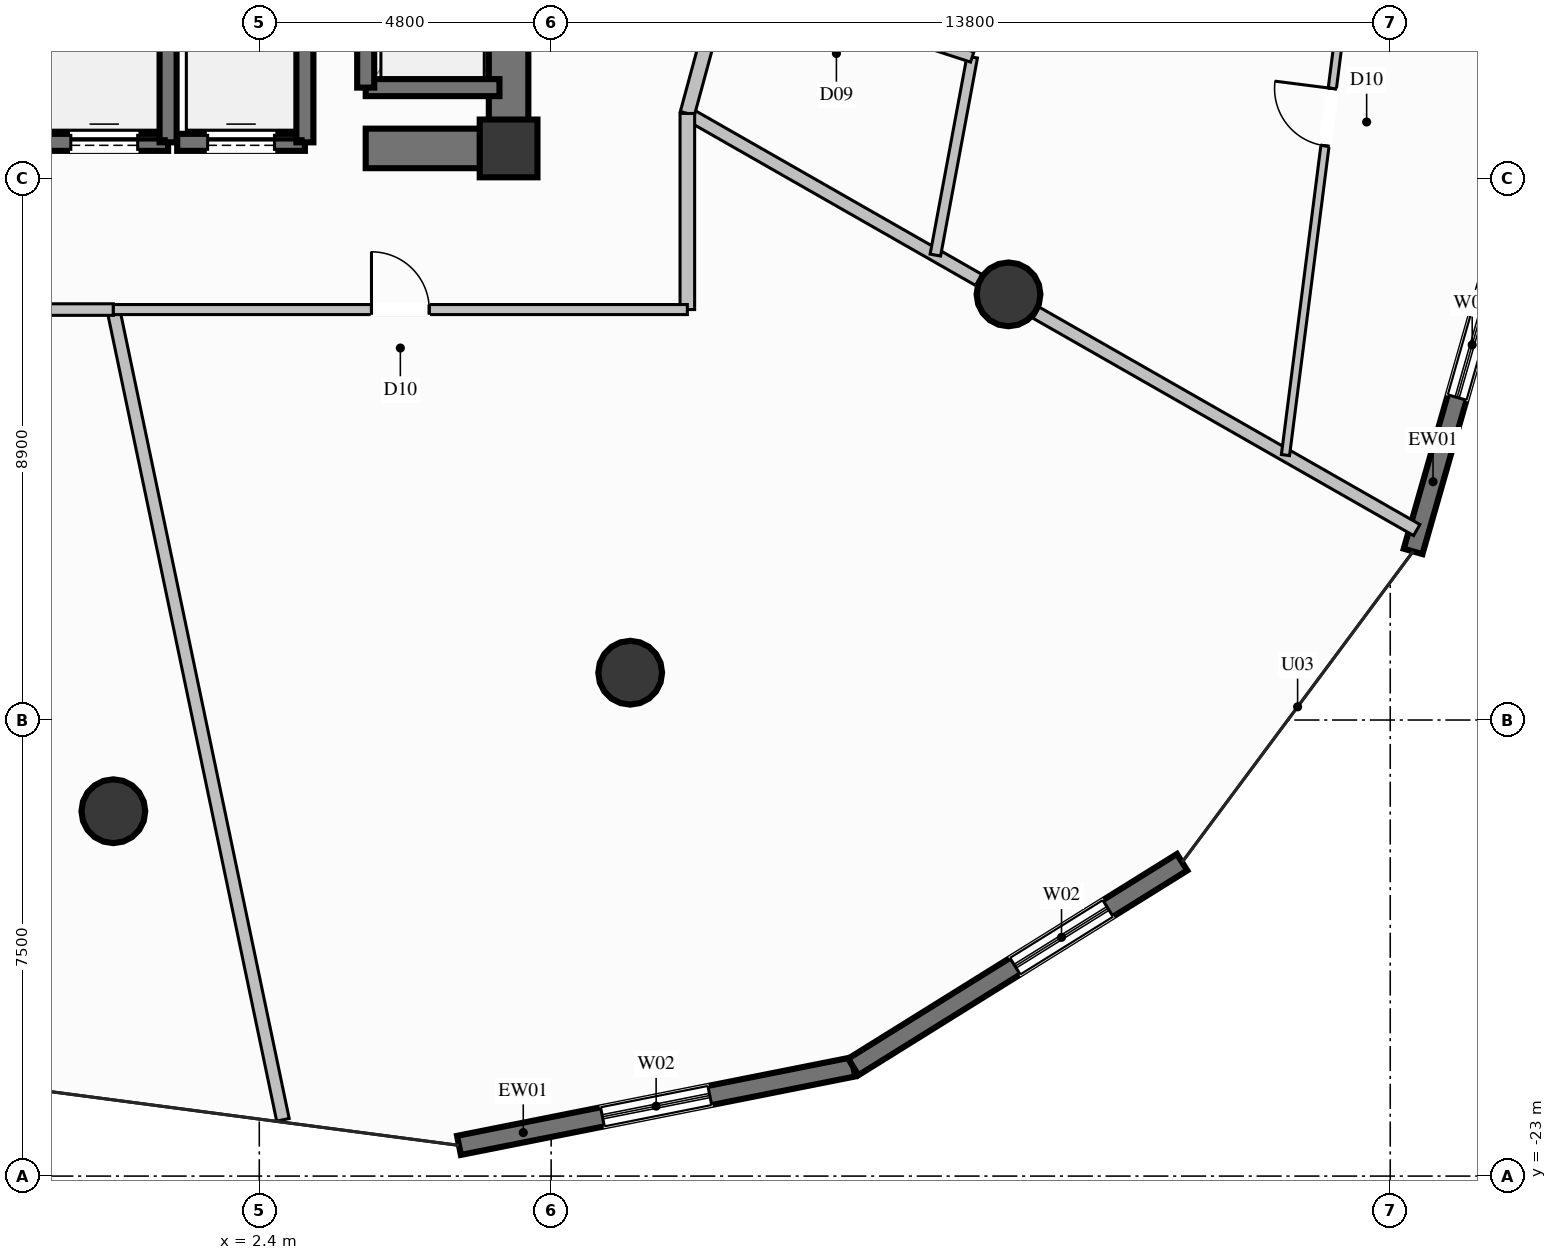
"""IFC4 building model, lengths in metres.
Left out: names, types, materials, properties, quantities, classifications, styles, units other than length and angle.
Written with IfcOpenShell. Run it as: python <this file> out.ifc"""

import sys

from ifc_helpers import new_model, si_unit, direction, frame, frame_2d, origin, origin_2d, place, context, subcontext, project, spatial, rectangle, circle, extrude, element, fill, save


model = new_model("IFC4")
c1 = context("Model", 3, precision=1e-05, world=origin(), true_north=direction((0.0, 1.0)))
c2 = subcontext(c1, "Body", "Model", "MODEL_VIEW")
j1 = project(units=[si_unit("LENGTHUNIT", "METRE"), si_unit("PLANEANGLEUNIT", "RADIAN")], contexts=[c1])
p1 = place(None, origin())
s1 = spatial("IfcSite", under=j1, at=p1, CompositionType="ELEMENT")
p2 = place(p1, origin())
s2 = spatial("IfcBuilding", under=s1, at=p2, CompositionType="ELEMENT")
p3 = place(p2, frame((0.0, 0.0, 153.0)))
s3 = spatial("IfcBuildingStorey", under=s2, at=p3, CompositionType="ELEMENT", Elevation=153.0)
p4 = place(p3, frame((6.5, -6.1, 0.0), z_axis=(0.0, 0.0, 1.0), x_axis=(1.0, 0.0, 0.0)))
e1 = element("IfcColumn", 1, at=p4, inside=s3, PredefinedType="COLUMN", context=c2, shape_type="SweptSolid", body=[
    extrude(rectangle(XDim=0.95, YDim=0.95, at=origin_2d()), origin(), (0.0, 0.0, 1.0), 3.6),
])
p5 = place(p3, frame((4.15, -6.1, 0.0), z_axis=(0.0, 0.0, 1.0), x_axis=(1.0, 0.0, 0.0)))
e2 = element("IfcWall", 2, at=p5, inside=s3, PredefinedType="SHEAR", context=c2, shape_type="SweptSolid", body=[
    extrude(rectangle(XDim=2.025, YDim=0.65, at=frame_2d((1.013, 0.0))), origin(), (0.0, 0.0, 1.0), 3.6),
])
p6 = place(p3, frame((6.5, -6.425, 0.0), z_axis=(0.0, 0.0, 1.0), x_axis=(0.0, 1.0, 0.0)))
e3 = element("IfcWall", 3, at=p6, inside=s3, PredefinedType="SHEAR", context=c2, shape_type="SweptSolid", body=[
    extrude(rectangle(XDim=4.075, YDim=0.65, at=frame_2d((2.038, 0.0))), origin(), (0.0, 0.0, 1.0), 3.6),
])
for number, where, z_axis, x_axis in (
    (4, (0.0, -17.0, 0.0), (0.0, 0.0, 1.0), (1.0, 0.0, 0.0)),
    (5, (8.5, -14.722, 0.0), (0.0, 0.0, 1.0), (1.0, 0.0, 0.0)),
    (6, (14.722, -8.5, 0.0), (0.0, 0.0, 1.0), (1.0, 0.0, 0.0)),
):
    element("IfcColumn", number, at=place(p3, frame(where, z_axis=z_axis, x_axis=x_axis)), inside=s3, PredefinedType="COLUMN", context=c2, shape_type="SweptSolid", body=[
        extrude(circle(Radius=0.525, at=origin_2d()), origin(), (0.0, 0.0, 1.0), 3.6),
    ])
p7 = place(p3, frame((23.195, -6.369, 0.0), z_axis=(0.0, 0.0, 1.0), x_axis=(-0.275067292431, -0.961424976082, 0.0)))
e7 = element("IfcWall", 7, at=p7, inside=s3, PredefinedType="SOLIDWALL", context=c2, shape_type="SweptSolid", body=[
    extrude(rectangle(XDim=6.613, YDim=0.32, at=frame_2d((3.307, 0.0))), origin(), (0.0, 0.0, 1.0), 3.35),
])
p8 = place(p7, frame((2.18, 0.0, 0.35)))
e8 = element("IfcOpeningElement", 8, at=p8, cuts=e7, PredefinedType="OPENING", context=c2, shape_type="SweptSolid", body=[
    extrude(rectangle(XDim=1.8, YDim=2.6, at=frame_2d((0.9, 1.3))), frame((0.0, 0.17, 0.0), z_axis=(0.0, -1.0, 0.0), x_axis=(1.0, 0.0, 0.0)), (0.0, 0.0, 1.0), 0.34),
])
p9 = place(p3, frame((12.169, -21.205, 0.0), z_axis=(0.0, 0.0, 1.0), x_axis=(-0.980781820462, -0.195107715508, 0.0)))
e9 = element("IfcWall", 9, at=p9, inside=s3, PredefinedType="SOLIDWALL", context=c2, shape_type="SweptSolid", body=[
    extrude(rectangle(XDim=6.612, YDim=0.32, at=frame_2d((3.306, 0.0))), origin(), (0.0, 0.0, 1.0), 3.35),
])
p10 = place(p9, frame((2.406, 0.0, 0.35)))
e10 = element("IfcOpeningElement", 10, at=p10, cuts=e9, PredefinedType="OPENING", context=c2, shape_type="SweptSolid", body=[
    extrude(rectangle(XDim=1.8, YDim=2.6, at=frame_2d((0.9, 1.3))), frame((0.0, 0.17, 0.0), z_axis=(0.0, -1.0, 0.0), x_axis=(1.0, 0.0, 0.0)), (0.0, 0.0, 1.0), 0.34),
])
p11 = place(p3, frame((17.577, -17.839, 0.0), z_axis=(0.0, 0.0, 1.0), x_axis=(-0.848985153837, -0.52841669974, 0.0)))
e11 = element("IfcWall", 11, at=p11, inside=s3, PredefinedType="SOLIDWALL", context=c2, shape_type="SweptSolid", body=[
    extrude(rectangle(XDim=6.37, YDim=0.32, at=frame_2d((3.185, 0.0))), origin(), (0.0, 0.0, 1.0), 3.35),
])
p12 = place(p11, frame((1.436, 0.0, 0.35)))
e12 = element("IfcOpeningElement", 12, at=p12, cuts=e11, PredefinedType="OPENING", context=c2, shape_type="SweptSolid", body=[
    extrude(rectangle(XDim=1.8, YDim=2.6, at=frame_2d((0.9, 1.3))), frame((0.0, 0.17, 0.0), z_axis=(0.0, -1.0, 0.0), x_axis=(1.0, 0.0, 0.0)), (0.0, 0.0, 1.0), 0.34),
])
p13 = place(p3, frame((-1.2, -6.0, 0.0), z_axis=(0.0, 0.0, 1.0), x_axis=(1.0, 0.0, 0.0)))
e13 = element("IfcWall", 13, at=p13, inside=s3, PredefinedType="SOLIDWALL", context=c2, shape_type="SweptSolid", body=[
    extrude(rectangle(XDim=2.1, YDim=0.28, at=frame_2d((1.05, 0.0))), origin(), (0.0, 0.0, 1.0), 3.35),
])
p14 = place(p13, frame((0.5, 0.0, 0.0)))
e14 = element("IfcOpeningElement", 14, at=p14, cuts=e13, PredefinedType="OPENING", context=c2, shape_type="SweptSolid", body=[
    extrude(rectangle(XDim=1.1, YDim=2.2, at=frame_2d((0.55, 1.1))), frame((0.0, 0.15, 0.0), z_axis=(0.0, -1.0, 0.0), x_axis=(1.0, 0.0, 0.0)), (0.0, 0.0, 1.0), 0.3),
])
p15 = place(p3, frame((0.9, -6.0, 0.0), z_axis=(0.0, 0.0, 1.0), x_axis=(0.0, 1.0, 0.0)))
e15 = element("IfcWall", 15, at=p15, inside=s3, PredefinedType="SOLIDWALL", context=c2, shape_type="SweptSolid", body=[
    extrude(rectangle(XDim=2.5, YDim=0.28, at=frame_2d((1.25, 0.0))), origin(), (0.0, 0.0, 1.0), 3.35),
])
p16 = place(p3, frame((1.05, -6.0, 0.0), z_axis=(0.0, 0.0, 1.0), x_axis=(1.0, 0.0, 0.0)))
e16 = element("IfcWall", 16, at=p16, inside=s3, PredefinedType="SOLIDWALL", context=c2, shape_type="SweptSolid", body=[
    extrude(rectangle(XDim=2.1, YDim=0.28, at=frame_2d((1.05, 0.0))), origin(), (0.0, 0.0, 1.0), 3.35),
])
p17 = place(p16, frame((0.5, 0.0, 0.0)))
e17 = element("IfcOpeningElement", 17, at=p17, cuts=e16, PredefinedType="OPENING", context=c2, shape_type="SweptSolid", body=[
    extrude(rectangle(XDim=1.1, YDim=2.2, at=frame_2d((0.55, 1.1))), frame((0.0, 0.15, 0.0), z_axis=(0.0, -1.0, 0.0), x_axis=(1.0, 0.0, 0.0)), (0.0, 0.0, 1.0), 0.3),
])
p18 = place(p3, frame((3.15, -6.0, 0.0), z_axis=(0.0, 0.0, 1.0), x_axis=(0.0, 1.0, 0.0)))
e18 = element("IfcWall", 18, at=p18, inside=s3, PredefinedType="SOLIDWALL", context=c2, shape_type="SweptSolid", body=[
    extrude(rectangle(XDim=2.5, YDim=0.28, at=frame_2d((1.25, 0.0))), origin(), (0.0, 0.0, 1.0), 3.35),
])
p19 = place(p3, frame((4.15, -5.1, 0.0), z_axis=(0.0, 0.0, 1.0), x_axis=(1.0, 0.0, 0.0)))
e19 = element("IfcWall", 19, at=p19, inside=s3, PredefinedType="SOLIDWALL", context=c2, shape_type="SweptSolid", body=[
    extrude(rectangle(XDim=2.2, YDim=0.28, at=frame_2d((1.1, 0.0))), origin(), (0.0, 0.0, 1.0), 3.35),
])
p20 = place(p3, frame((4.15, -2.4, 0.0), z_axis=(0.0, 0.0, 1.0), x_axis=(0.0, -1.0, 0.0)))
e20 = element("IfcWall", 20, at=p20, inside=s3, PredefinedType="SOLIDWALL", context=c2, shape_type="SweptSolid", body=[
    extrude(rectangle(XDim=2.7, YDim=0.28, at=frame_2d((1.35, 0.0))), origin(), (0.0, 0.0, 1.0), 3.35),
])
p21 = place(p3, frame((9.44, -5.525, 0.0), z_axis=(0.0, 0.0, 1.0), x_axis=(0.868338411793, -0.495972179265, 0.0)))
e21 = element("IfcWall", 21, at=p21, inside=s3, PredefinedType="PARTITIONING", context=c2, shape_type="SweptSolid", body=[
    extrude(rectangle(XDim=5.519, YDim=0.21, at=frame_2d((2.759, 0.0))), origin(), (0.0, 0.0, 1.0), 2.791),
])
p22 = place(p3, frame((15.176, -8.801, 0.0), z_axis=(0.0, 0.0, 1.0), x_axis=(0.868374410063, -0.495909148885, 0.0)))
e22 = element("IfcWall", 22, at=p22, inside=s3, PredefinedType="PARTITIONING", context=c2, shape_type="SweptSolid", body=[
    extrude(rectangle(XDim=7.209, YDim=0.21, at=frame_2d((3.604, 0.0))), origin(), (0.0, 0.0, 1.0), 3.35),
])
p23 = place(p3, frame((9.44, -5.525, 0.0), z_axis=(0.0, 0.0, 1.0), x_axis=(0.262136756532, 0.965030735715, 0.0)))
e23 = element("IfcWall", 23, at=p23, inside=s3, PredefinedType="PARTITIONING", context=c2, shape_type="SweptSolid", body=[
    extrude(rectangle(XDim=2.339, YDim=0.24, at=frame_2d((1.169, 0.0))), origin(), (0.0, 0.0, 1.0), 3.35),
])
p24 = place(p3, frame((13.519, -7.854, 0.0), z_axis=(0.0, 0.0, 1.0), x_axis=(0.182904603297, 0.983130665829, 0.0)))
e24 = element("IfcWall", 24, at=p24, inside=s3, PredefinedType="PLUMBINGWALL", context=c2, shape_type="SweptSolid", body=[
    extrude(rectangle(XDim=3.313, YDim=0.175, at=frame_2d((1.656, 0.0))), origin(), (0.0, 0.0, 1.0), 3.35),
])
p25 = place(p3, frame((10.053, -3.268, 0.0), z_axis=(0.0, 0.0, 1.0), x_axis=(0.95065932904, -0.310236748484, 0.0)))
e25 = element("IfcWall", 25, at=p25, inside=s3, PredefinedType="PLUMBINGWALL", context=c2, shape_type="SweptSolid", body=[
    extrude(rectangle(XDim=4.283, YDim=0.175, at=frame_2d((2.142, 0.0))), origin(), (0.0, 0.0, 1.0), 3.35),
])
p26 = place(p25, frame((1.692, 0.0, 0.0)))
e26 = element("IfcOpeningElement", 26, at=p26, cuts=e25, PredefinedType="OPENING", context=c2, shape_type="SweptSolid", body=[
    extrude(rectangle(XDim=0.9, YDim=2.1, at=frame_2d((0.45, 1.05))), frame((0.0, 0.098, 0.0), z_axis=(0.0, -1.0, 0.0), x_axis=(1.0, 0.0, 0.0)), (0.0, 0.0, 1.0), 0.195),
])
p27 = place(p3, frame((19.277, -11.143, 0.0), z_axis=(0.0, 0.0, 1.0), x_axis=(0.126707598937, 0.991940111283, 0.0)))
e27 = element("IfcWall", 27, at=p27, inside=s3, PredefinedType="PARTITIONING", context=c2, shape_type="SweptSolid", body=[
    extrude(rectangle(XDim=11.206, YDim=0.135, at=frame_2d((5.603, 0.0))), origin(), (0.0, 0.0, 1.0), 3.35),
])
p28 = place(p27, frame((5.128, 0.0, 0.0)))
e28 = element("IfcOpeningElement", 28, at=p28, cuts=e27, PredefinedType="OPENING", context=c2, shape_type="SweptSolid", body=[
    extrude(rectangle(XDim=0.95, YDim=2.1, at=frame_2d((0.475, 1.05))), frame((0.0, 0.078, 0.0), z_axis=(0.0, -1.0, 0.0), x_axis=(1.0, 0.0, 0.0)), (0.0, 0.0, 1.0), 0.155),
])
p29 = place(p3, frame((0.0, -8.75, 0.0), z_axis=(0.0, 0.0, 1.0), x_axis=(0.204871544732, -0.978788869041, 0.0)))
e29 = element("IfcWall", 29, at=p29, inside=s3, PredefinedType="PARTITIONING", context=c2, shape_type="SweptSolid", body=[
    extrude(rectangle(XDim=13.614, YDim=0.21, at=frame_2d((6.807, 0.0))), origin(), (0.0, 0.0, 1.0), 3.35),
])
p30 = place(p3, frame((-9.44, -8.75, 0.0), z_axis=(0.0, 0.0, 1.0), x_axis=(1.0, 0.0, 0.0)))
e30 = element("IfcWall", 30, at=p30, inside=s3, PredefinedType="PARTITIONING", context=c2, shape_type="SweptSolid", body=[
    extrude(rectangle(XDim=9.44, YDim=0.19, at=frame_2d((4.72, 0.0))), origin(), (0.0, 0.0, 1.0), 3.35),
])
p31 = place(p30, frame((4.245, 0.0, 0.0)))
e31 = element("IfcOpeningElement", 31, at=p31, cuts=e30, PredefinedType="OPENING", context=c2, shape_type="SweptSolid", body=[
    extrude(rectangle(XDim=0.95, YDim=2.1, at=frame_2d((0.475, 1.05))), frame((0.0, 0.105, 0.0), z_axis=(0.0, -1.0, 0.0), x_axis=(1.0, 0.0, 0.0)), (0.0, 0.0, 1.0), 0.21),
])
p32 = place(p3, frame((9.44, -8.75, 0.0), z_axis=(0.0, 0.0, 1.0), x_axis=(0.0, 1.0, 0.0)))
e32 = element("IfcWall", 32, at=p32, inside=s3, PredefinedType="PARTITIONING", context=c2, shape_type="SweptSolid", body=[
    extrude(rectangle(XDim=3.225, YDim=0.24, at=frame_2d((1.613, 0.0))), origin(), (0.0, 0.0, 1.0), 3.35),
])
p33 = place(p3, frame((0.0, -8.75, 0.0), z_axis=(0.0, 0.0, 1.0), x_axis=(1.0, 0.0, 0.0)))
e33 = element("IfcWall", 33, at=p33, inside=s3, PredefinedType="PARTITIONING", context=c2, shape_type="SweptSolid", body=[
    extrude(rectangle(XDim=9.44, YDim=0.165, at=frame_2d((4.72, 0.0))), origin(), (0.0, 0.0, 1.0), 3.35),
])
p34 = place(p33, frame((4.245, 0.0, 0.0)))
e34 = element("IfcOpeningElement", 34, at=p34, cuts=e33, PredefinedType="OPENING", context=c2, shape_type="SweptSolid", body=[
    extrude(rectangle(XDim=0.95, YDim=2.1, at=frame_2d((0.475, 1.05))), frame((0.0, 0.093, 0.0), z_axis=(0.0, -1.0, 0.0), x_axis=(1.0, 0.0, 0.0)), (0.0, 0.0, 1.0), 0.185),
])
p35 = place(p8, origin())
e35 = element("IfcWindow", 35, at=p35, inside=s3, PartitioningType="SINGLE_PANEL", PredefinedType="WINDOW", context=c2, shape_type="SweptSolid", body=[
    extrude(rectangle(XDim=1.8, YDim=2.6, at=frame_2d((0.9, 1.3))), frame((0.0, 0.03, 0.0), z_axis=(0.0, -1.0, 0.0), x_axis=(1.0, 0.0, 0.0)), (0.0, 0.0, 1.0), 0.06),
])
fill(e8, e35)
p36 = place(p10, origin())
e36 = element("IfcWindow", 36, at=p36, inside=s3, PartitioningType="SINGLE_PANEL", PredefinedType="WINDOW", context=c2, shape_type="SweptSolid", body=[
    extrude(rectangle(XDim=1.8, YDim=2.6, at=frame_2d((0.9, 1.3))), frame((0.0, 0.03, 0.0), z_axis=(0.0, -1.0, 0.0), x_axis=(1.0, 0.0, 0.0)), (0.0, 0.0, 1.0), 0.06),
])
fill(e10, e36)
p37 = place(p12, origin())
e37 = element("IfcWindow", 37, at=p37, inside=s3, PartitioningType="SINGLE_PANEL", PredefinedType="WINDOW", context=c2, shape_type="SweptSolid", body=[
    extrude(rectangle(XDim=1.8, YDim=2.6, at=frame_2d((0.9, 1.3))), frame((0.0, 0.03, 0.0), z_axis=(0.0, -1.0, 0.0), x_axis=(1.0, 0.0, 0.0)), (0.0, 0.0, 1.0), 0.06),
])
fill(e12, e37)
p38 = place(p14, origin())
e38 = element("IfcDoor", 38, at=p38, inside=s3, OperationType="SLIDING_TO_LEFT", PredefinedType="DOOR", context=c2, shape_type="SweptSolid", body=[
    extrude(rectangle(XDim=1.1, YDim=2.2, at=frame_2d((0.55, 1.1))), frame((0.0, 0.025, 0.0), z_axis=(0.0, -1.0, 0.0), x_axis=(1.0, 0.0, 0.0)), (0.0, 0.0, 1.0), 0.05),
])
fill(e14, e38)
p39 = place(p17, origin())
e39 = element("IfcDoor", 39, at=p39, inside=s3, OperationType="SLIDING_TO_LEFT", PredefinedType="DOOR", context=c2, shape_type="SweptSolid", body=[
    extrude(rectangle(XDim=1.1, YDim=2.2, at=frame_2d((0.55, 1.1))), frame((0.0, 0.025, 0.0), z_axis=(0.0, -1.0, 0.0), x_axis=(1.0, 0.0, 0.0)), (0.0, 0.0, 1.0), 0.05),
])
fill(e17, e39)
p40 = place(p28, origin())
e40 = element("IfcDoor", 40, at=p40, inside=s3, OperationType="SINGLE_SWING_RIGHT", PredefinedType="DOOR", context=c2, shape_type="SweptSolid", body=[
    extrude(rectangle(XDim=0.95, YDim=2.1, at=frame_2d((0.475, 1.05))), frame((0.0, 0.025, 0.0), z_axis=(0.0, -1.0, 0.0), x_axis=(1.0, 0.0, 0.0)), (0.0, 0.0, 1.0), 0.05),
])
fill(e28, e40)
p41 = place(p34, origin())
e41 = element("IfcDoor", 41, at=p41, inside=s3, OperationType="SINGLE_SWING_LEFT", PredefinedType="DOOR", context=c2, shape_type="SweptSolid", body=[
    extrude(rectangle(XDim=0.95, YDim=2.1, at=frame_2d((0.475, 1.05))), frame((0.0, 0.025, 0.0), z_axis=(0.0, -1.0, 0.0), x_axis=(1.0, 0.0, 0.0)), (0.0, 0.0, 1.0), 0.05),
])
fill(e34, e41)
save(model, sys.argv[1])
